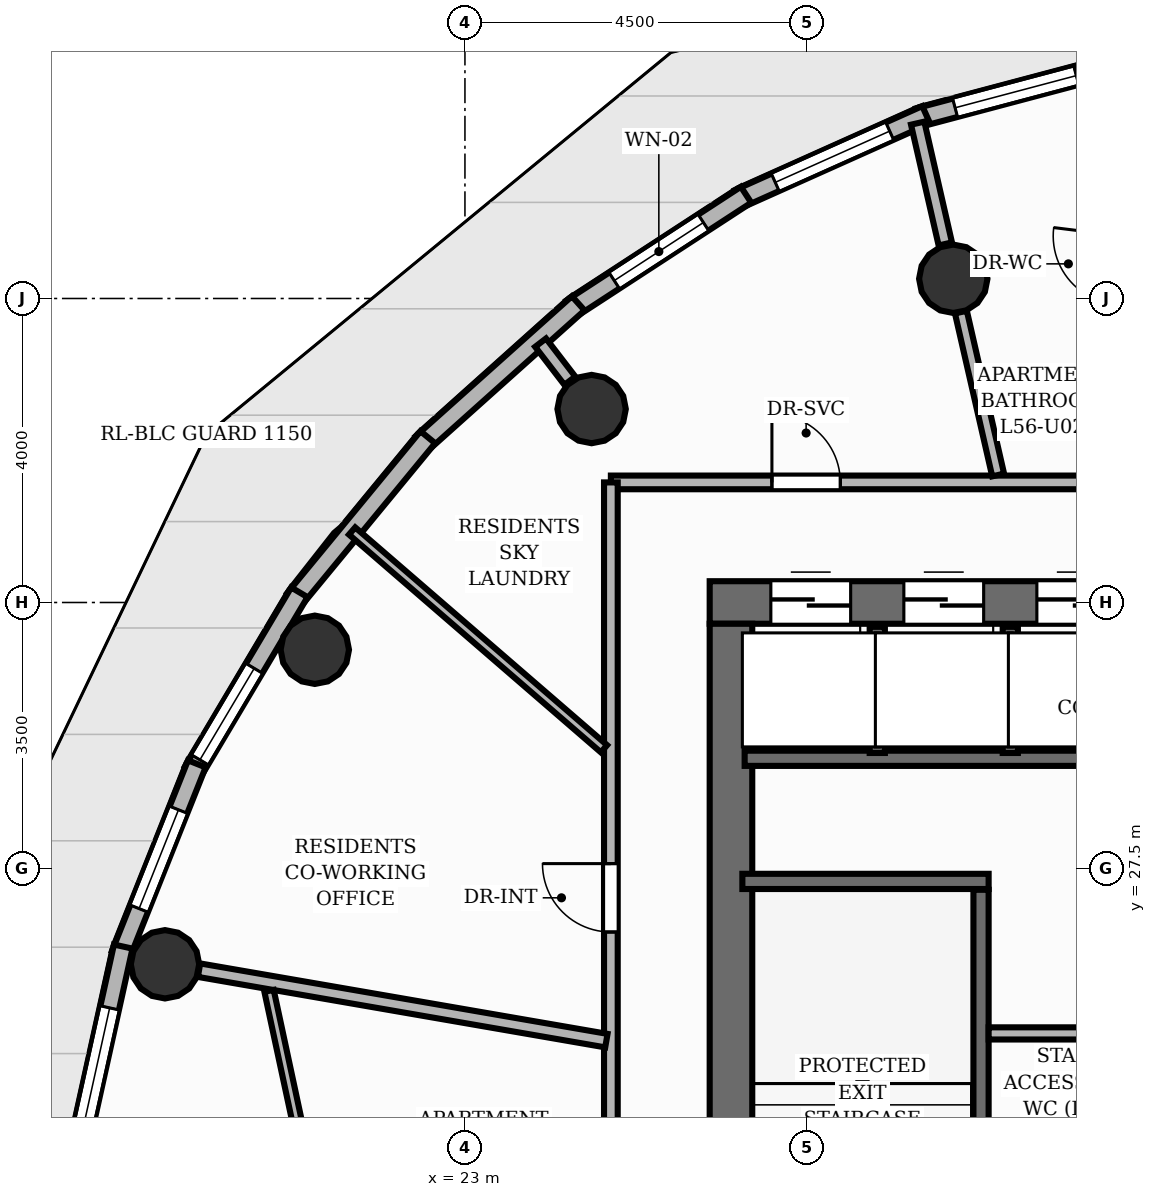
"""IFC4 building model, lengths in metres.
Left out: names, types, materials, properties, quantities, classifications, styles, units other than length and angle.
Written with IfcOpenShell. Run it as: python <this file> out.ifc"""

import sys

from ifc_helpers import new_model, si_unit, direction, frame, frame_2d, origin, origin_2d, place, context, subcontext, project, spatial, rectangle, circle, extrude, element, fill, save


model = new_model("IFC4")
c1 = context("Model", 3, precision=1e-05, world=origin(), true_north=direction((0.0, 1.0)))
c2 = subcontext(c1, "Body", "Model", "MODEL_VIEW")
j1 = project(units=[si_unit("LENGTHUNIT", "METRE"), si_unit("PLANEANGLEUNIT", "RADIAN")], contexts=[c1])
p1 = place(None, origin())
s1 = spatial("IfcSite", under=j1, at=p1, CompositionType="ELEMENT")
p2 = place(p1, origin())
s2 = spatial("IfcBuilding", under=s1, at=p2, CompositionType="ELEMENT")
p3 = place(p2, frame((0.0, 0.0, 188.64)))
s3 = spatial("IfcBuildingStorey", under=s2, at=p3, CompositionType="ELEMENT", Elevation=188.64)
p4 = place(p3, frame((26.22, 31.0, 0.0), z_axis=(0.0, 0.0, 1.0), x_axis=(1.0, 0.0, 0.0)))
e1 = element("IfcWall", 1, at=p4, inside=s3, PredefinedType="SHEAR", context=c2, shape_type="SweptSolid", body=[
    extrude(rectangle(XDim=11.56, YDim=0.56, at=frame_2d((5.78, 0.0))), origin(), (0.0, 0.0, 1.0), 3.2),
])
p5 = place(p4, frame((8.18, 0.0, 0.0)))
e2 = element("IfcOpeningElement", 2, at=p5, cuts=e1, PredefinedType="OPENING", context=c2, shape_type="SweptSolid", body=[
    extrude(rectangle(XDim=1.1, YDim=2.15, at=frame_2d((0.55, 1.075))), frame((0.0, 0.29, 0.0), z_axis=(0.0, -1.0, 0.0), x_axis=(1.0, 0.0, 0.0)), (0.0, 0.0, 1.0), 0.58),
])
p6 = place(p4, frame((0.805, 0.0, 0.0)))
e3 = element("IfcOpeningElement", 3, at=p6, cuts=e1, PredefinedType="OPENING", context=c2, shape_type="SweptSolid", body=[
    extrude(rectangle(XDim=1.05, YDim=2.15, at=frame_2d((0.525, 1.075))), frame((0.0, 0.29, 0.0), z_axis=(0.0, -1.0, 0.0), x_axis=(1.0, 0.0, 0.0)), (0.0, 0.0, 1.0), 0.58),
])
p7 = place(p4, frame((2.555, 0.0, 0.0)))
e4 = element("IfcOpeningElement", 4, at=p7, cuts=e1, PredefinedType="OPENING", context=c2, shape_type="SweptSolid", body=[
    extrude(rectangle(XDim=1.05, YDim=2.15, at=frame_2d((0.525, 1.075))), frame((0.0, 0.29, 0.0), z_axis=(0.0, -1.0, 0.0), x_axis=(1.0, 0.0, 0.0)), (0.0, 0.0, 1.0), 0.58),
])
p8 = place(p4, frame((4.305, 0.0, 0.0)))
e5 = element("IfcOpeningElement", 5, at=p8, cuts=e1, PredefinedType="OPENING", context=c2, shape_type="SweptSolid", body=[
    extrude(rectangle(XDim=1.05, YDim=2.15, at=frame_2d((0.525, 1.075))), frame((0.0, 0.29, 0.0), z_axis=(0.0, -1.0, 0.0), x_axis=(1.0, 0.0, 0.0)), (0.0, 0.0, 1.0), 0.58),
])
p9 = place(p3, frame((26.5, 17.28, 0.0), z_axis=(0.0, 0.0, 1.0), x_axis=(0.0, 1.0, 0.0)))
e6 = element("IfcWall", 6, at=p9, inside=s3, PredefinedType="SHEAR", context=c2, shape_type="SweptSolid", body=[
    extrude(rectangle(XDim=13.44, YDim=0.56, at=frame_2d((6.72, 0.0))), origin(), (0.0, 0.0, 1.0), 3.2),
])
for number, where, z_axis, x_axis in (
    (7, (29.425, 35.26, 0.0), (0.0, 0.0, 1.0), (1.0, 0.0, 0.0)),
    (8, (24.667, 33.545, 0.0), (0.0, 0.0, 1.0), (1.0, 0.0, 0.0)),
    (9, (21.025, 30.378, 0.0), (0.0, 0.0, 1.0), (1.0, 0.0, 0.0)),
    (10, (19.054, 26.24, 0.0), (0.0, 0.0, 1.0), (1.0, 0.0, 0.0)),
):
    element("IfcColumn", number, at=place(p3, frame(where, z_axis=z_axis, x_axis=x_axis)), inside=s3, PredefinedType="COLUMN", context=c2, shape_type="SweptSolid", body=[
        extrude(circle(Radius=0.45, at=origin_2d()), origin(), (0.0, 0.0, 1.0), 3.2),
    ])
p10 = place(p3, frame((28.965, 37.381, 0.0), z_axis=(0.0, 0.0, 1.0), x_axis=(0.96652474621, 0.256573410476, 0.0)))
e11 = element("IfcWall", 11, at=p10, inside=s3, PredefinedType="SOLIDWALL", context=c2, shape_type="SweptSolid", body=[
    extrude(rectangle(XDim=2.651, YDim=0.25, at=frame_2d((1.325, 0.0))), origin(), (0.0, 0.0, 1.0), 2.96),
])
p11 = place(p10, frame((0.501, 0.0, 0.85)))
e12 = element("IfcOpeningElement", 12, at=p11, cuts=e11, PredefinedType="OPENING", context=c2, shape_type="SweptSolid", body=[
    extrude(rectangle(XDim=1.65, YDim=1.55, at=frame_2d((0.825, 0.775))), frame((0.0, 0.135, 0.0), z_axis=(0.0, -1.0, 0.0), x_axis=(1.0, 0.0, 0.0)), (0.0, 0.0, 1.0), 0.27),
])
p12 = place(p3, frame((26.603, 36.313, 0.0), z_axis=(0.0, 0.0, 1.0), x_axis=(0.912615139532, 0.408819773368, 0.0)))
e13 = element("IfcWall", 13, at=p12, inside=s3, PredefinedType="SOLIDWALL", context=c2, shape_type="SweptSolid", body=[
    extrude(rectangle(XDim=2.702, YDim=0.25, at=frame_2d((1.351, 0.0))), origin(), (0.0, 0.0, 1.0), 2.96),
])
p13 = place(p12, frame((0.526, 0.0, 0.85)))
e14 = element("IfcOpeningElement", 14, at=p13, cuts=e13, PredefinedType="OPENING", context=c2, shape_type="SweptSolid", body=[
    extrude(rectangle(XDim=1.65, YDim=1.55, at=frame_2d((0.825, 0.775))), frame((0.0, 0.135, 0.0), z_axis=(0.0, -1.0, 0.0), x_axis=(1.0, 0.0, 0.0)), (0.0, 0.0, 1.0), 0.27),
])
p14 = place(p3, frame((24.404, 34.87, 0.0), z_axis=(0.0, 0.0, 1.0), x_axis=(0.837860586987, 0.545884270496, 0.0)))
e15 = element("IfcWall", 15, at=p14, inside=s3, PredefinedType="SOLIDWALL", context=c2, shape_type="SweptSolid", body=[
    extrude(rectangle(XDim=2.739, YDim=0.25, at=frame_2d((1.369, 0.0))), origin(), (0.0, 0.0, 1.0), 2.96),
])
p15 = place(p14, frame((0.669, 0.0, 0.85)))
e16 = element("IfcOpeningElement", 16, at=p15, cuts=e15, PredefinedType="OPENING", context=c2, shape_type="SweptSolid", body=[
    extrude(rectangle(XDim=1.4, YDim=1.55, at=frame_2d((0.7, 0.775))), frame((0.0, 0.135, 0.0), z_axis=(0.0, -1.0, 0.0), x_axis=(1.0, 0.0, 0.0)), (0.0, 0.0, 1.0), 0.27),
])
for number, where, z_axis, x_axis in (
    (17, (22.436, 33.096, 0.0), (0.0, 0.0, 1.0), (0.745, 0.667, 0.0)),
    (18, (20.759, 31.045, 0.0), (0.0, 0.0, 1.0), (0.635, 0.772, 0.0)),
):
    element("IfcWall", number, at=place(p3, frame(where, z_axis=z_axis, x_axis=x_axis)), inside=s3, PredefinedType="SOLIDWALL", context=c2, shape_type="SweptSolid", body=[
        extrude(rectangle(XDim=2.758, YDim=0.25, at=frame_2d((1.379, 0.0))), origin(), (0.0, 0.0, 1.0), 2.96),
    ])
p16 = place(p3, frame((19.424, 28.779, 0.0), z_axis=(0.0, 0.0, 1.0), x_axis=(0.510320389621, 0.859984360287, 0.0)))
e19 = element("IfcWall", 19, at=p16, inside=s3, PredefinedType="SOLIDWALL", context=c2, shape_type="SweptSolid", body=[
    extrude(rectangle(XDim=2.738, YDim=0.25, at=frame_2d((1.369, 0.0))), origin(), (0.0, 0.0, 1.0), 2.96),
])
p17 = place(p16, frame((0.175, 0.0, 0.85)))
e20 = element("IfcOpeningElement", 20, at=p17, cuts=e19, PredefinedType="OPENING", context=c2, shape_type="SweptSolid", body=[
    extrude(rectangle(XDim=1.4, YDim=1.55, at=frame_2d((0.7, 0.775))), frame((0.0, 0.135, 0.0), z_axis=(0.0, -1.0, 0.0), x_axis=(1.0, 0.0, 0.0)), (0.0, 0.0, 1.0), 0.27),
])
p18 = place(p3, frame((18.472, 26.367, 0.0), z_axis=(0.0, 0.0, 1.0), x_axis=(0.370330939431, 0.928899884433, 0.0)))
e21 = element("IfcWall", 21, at=p18, inside=s3, PredefinedType="SOLIDWALL", context=c2, shape_type="SweptSolid", body=[
    extrude(rectangle(XDim=2.702, YDim=0.25, at=frame_2d((1.351, 0.0))), origin(), (0.0, 0.0, 1.0), 2.96),
])
p19 = place(p18, frame((0.651, 0.0, 0.85)))
e22 = element("IfcOpeningElement", 22, at=p19, cuts=e21, PredefinedType="OPENING", context=c2, shape_type="SweptSolid", body=[
    extrude(rectangle(XDim=1.4, YDim=1.55, at=frame_2d((0.7, 0.775))), frame((0.0, 0.135, 0.0), z_axis=(0.0, -1.0, 0.0), x_axis=(1.0, 0.0, 0.0)), (0.0, 0.0, 1.0), 0.27),
])
p20 = place(p3, frame((17.932, 23.884, 0.0), z_axis=(0.0, 0.0, 1.0), x_axis=(0.215877166516, 0.976420528756, 0.0)))
e23 = element("IfcWall", 23, at=p20, inside=s3, PredefinedType="SOLIDWALL", context=c2, shape_type="SweptSolid", body=[
    extrude(rectangle(XDim=2.651, YDim=0.25, at=frame_2d((1.325, 0.0))), origin(), (0.0, 0.0, 1.0), 2.96),
])
p21 = place(p20, frame((0.175, 0.0, 0.85)))
e24 = element("IfcOpeningElement", 24, at=p21, cuts=e23, PredefinedType="OPENING", context=c2, shape_type="SweptSolid", body=[
    extrude(rectangle(XDim=1.65, YDim=1.55, at=frame_2d((0.825, 0.775))), frame((0.0, 0.135, 0.0), z_axis=(0.0, -1.0, 0.0), x_axis=(1.0, 0.0, 0.0)), (0.0, 0.0, 1.0), 0.27),
])
p22 = place(p3, frame((29.79, 20.78, 0.0), z_axis=(0.0, 0.0, 1.0), x_axis=(0.0, 1.0, 0.0)))
e25 = element("IfcWall", 25, at=p22, inside=s3, PredefinedType="SHEAR", context=c2, shape_type="SweptSolid", body=[
    extrude(rectangle(XDim=6.44, YDim=0.2, at=frame_2d((3.22, 0.0))), origin(), (0.0, 0.0, 1.0), 3.2),
])
p23 = place(p3, frame((26.65, 27.33, 0.0), z_axis=(0.0, 0.0, 1.0), x_axis=(1.0, 0.0, 0.0)))
e26 = element("IfcWall", 26, at=p23, inside=s3, PredefinedType="SHEAR", context=c2, shape_type="SweptSolid", body=[
    extrude(rectangle(XDim=3.24, YDim=0.2, at=frame_2d((1.62, 0.0))), origin(), (0.0, 0.0, 1.0), 3.2),
])
p24 = place(p3, frame((26.68, 28.95, 0.0), z_axis=(0.0, 0.0, 1.0), x_axis=(1.0, 0.0, 0.0)))
e27 = element("IfcWall", 27, at=p24, inside=s3, PredefinedType="SHEAR", context=c2, shape_type="SweptSolid", body=[
    extrude(rectangle(XDim=5.24, YDim=0.2, at=frame_2d((2.62, 0.0))), origin(), (0.0, 0.0, 1.0), 3.2),
])
for number, where, z_axis, x_axis in (
    (28, (28.425, 29.02, 0.0), (0.0, 0.0, 1.0), (0.0, 1.0, 0.0)),
    (29, (30.175, 29.02, 0.0), (0.0, 0.0, 1.0), (0.0, 1.0, 0.0)),
):
    element("IfcWall", number, at=place(p3, frame(where, z_axis=z_axis, x_axis=x_axis)), inside=s3, PredefinedType="SHEAR", context=c2, shape_type="SweptSolid", body=[
        extrude(rectangle(XDim=1.66, YDim=0.2, at=frame_2d((0.83, 0.0))), origin(), (0.0, 0.0, 1.0), 3.2),
    ])
p25 = place(p3, frame((29.89, 25.33, 0.0), z_axis=(0.0, 0.0, 1.0), x_axis=(1.0, 0.0, 0.0)))
e30 = element("IfcWall", 30, at=p25, inside=s3, PredefinedType="PLUMBINGWALL", context=c2, shape_type="SweptSolid", body=[
    extrude(rectangle(XDim=1.94, YDim=0.16, at=frame_2d((0.97, 0.0))), origin(), (0.0, 0.0, 1.0), 2.955),
])
p26 = place(p3, frame((29.32, 35.718, 0.0), z_axis=(0.0, 0.0, 1.0), x_axis=(-0.222967107114, 0.974825968645, 0.0)))
e31 = element("IfcWall", 31, at=p26, inside=s3, PredefinedType="PARTITIONING", context=c2, shape_type="SweptSolid", body=[
    extrude(rectangle(XDim=1.63, YDim=0.18, at=frame_2d((0.815, 0.0))), origin(), (0.0, 0.0, 1.0), 2.404),
])
p27 = place(p3, frame((24.38, 33.918, 0.0), z_axis=(0.0, 0.0, 1.0), x_axis=(-0.609112888366, 0.793083532314, 0.0)))
e32 = element("IfcWall", 32, at=p27, inside=s3, PredefinedType="PARTITIONING", context=c2, shape_type="SweptSolid", body=[
    extrude(rectangle(XDim=0.632, YDim=0.18, at=frame_2d((0.316, 0.0))), origin(), (0.0, 0.0, 1.0), 2.404),
])
p28 = place(p3, frame((24.92, 32.58, 0.0), z_axis=(0.0, 0.0, 1.0), x_axis=(1.0, 0.0, 0.0)))
e33 = element("IfcWall", 33, at=p28, inside=s3, PredefinedType="PARTITIONING", context=c2, shape_type="SweptSolid", body=[
    extrude(rectangle(XDim=14.16, YDim=0.18, at=frame_2d((7.08, 0.0))), origin(), (0.0, 0.0, 1.0), 2.955),
])
p29 = place(p28, frame((8.186, 0.0, 0.0)))
e34 = element("IfcOpeningElement", 34, at=p29, cuts=e33, PredefinedType="OPENING", context=c2, shape_type="SweptSolid", body=[
    extrude(rectangle(XDim=1.05, YDim=2.15, at=frame_2d((0.525, 1.075))), frame((0.0, 0.1, 0.0), z_axis=(0.0, -1.0, 0.0), x_axis=(1.0, 0.0, 0.0)), (0.0, 0.0, 1.0), 0.2),
])
p30 = place(p28, frame((2.119, 0.0, 0.0)))
e35 = element("IfcOpeningElement", 35, at=p30, cuts=e33, PredefinedType="OPENING", context=c2, shape_type="SweptSolid", body=[
    extrude(rectangle(XDim=0.9, YDim=2.1, at=frame_2d((0.45, 1.05))), frame((0.0, 0.1, 0.0), z_axis=(0.0, -1.0, 0.0), x_axis=(1.0, 0.0, 0.0)), (0.0, 0.0, 1.0), 0.2),
])
p31 = place(p3, frame((24.92, 19.382, 0.0), z_axis=(0.0, 0.0, 1.0), x_axis=(0.0, 1.0, 0.0)))
e36 = element("IfcWall", 36, at=p31, inside=s3, PredefinedType="PARTITIONING", context=c2, shape_type="SweptSolid", body=[
    extrude(rectangle(XDim=13.198, YDim=0.18, at=frame_2d((6.599, 0.0))), origin(), (0.0, 0.0, 1.0), 2.955),
])
p32 = place(p31, frame((7.282, 0.0, 0.0)))
e37 = element("IfcOpeningElement", 37, at=p32, cuts=e36, PredefinedType="OPENING", context=c2, shape_type="SweptSolid", body=[
    extrude(rectangle(XDim=0.9, YDim=2.1, at=frame_2d((0.45, 1.05))), frame((0.0, 0.1, 0.0), z_axis=(0.0, -1.0, 0.0), x_axis=(1.0, 0.0, 0.0)), (0.0, 0.0, 1.0), 0.2),
])
p33 = place(p3, frame((30.015, 32.677, 0.0), z_axis=(0.0, 0.0, 1.0), x_axis=(-0.222969522248, 0.974825416241, 0.0)))
e38 = element("IfcWall", 38, at=p33, inside=s3, PredefinedType="PLUMBINGWALL", context=c2, shape_type="SweptSolid", body=[
    extrude(rectangle(XDim=2.199, YDim=0.16, at=frame_2d((1.099, 0.0))), origin(), (0.0, 0.0, 1.0), 2.404),
])
p34 = place(p3, frame((21.515, 31.941, 0.0), z_axis=(0.0, 0.0, 1.0), x_axis=(0.756468247818, -0.654030419815, 0.0)))
e39 = element("IfcWall", 39, at=p34, inside=s3, PredefinedType="PARTITIONING", context=c2, shape_type="SweptSolid", body=[
    extrude(rectangle(XDim=4.381, YDim=0.125, at=frame_2d((2.19, 0.0))), origin(), (0.0, 0.0, 1.0), 2.692),
])
p35 = place(p3, frame((24.861, 25.235, 0.0), z_axis=(0.0, 0.0, 1.0), x_axis=(-0.985368487575, 0.170437506711, 0.0)))
e40 = element("IfcWall", 40, at=p35, inside=s3, PredefinedType="PARTITIONING", context=c2, shape_type="SweptSolid", body=[
    extrude(rectangle(XDim=5.439, YDim=0.18, at=frame_2d((2.719, 0.0))), origin(), (0.0, 0.0, 1.0), 2.404),
])
p36 = place(p3, frame((22.173, 17.735, 0.0), z_axis=(0.0, 0.0, 1.0), x_axis=(-0.20987090056, 0.977729106194, 0.0)))
e41 = element("IfcWall", 41, at=p36, inside=s3, PredefinedType="PARTITIONING", context=c2, shape_type="SweptSolid", body=[
    extrude(rectangle(XDim=8.341, YDim=0.125, at=frame_2d((4.17, 0.0))), origin(), (0.0, 0.0, 1.0), 2.955),
])
p37 = place(p36, frame((3.72, 0.0, 0.0)))
e42 = element("IfcOpeningElement", 42, at=p37, cuts=e41, PredefinedType="OPENING", context=c2, shape_type="SweptSolid", body=[
    extrude(rectangle(XDim=0.9, YDim=2.1, at=frame_2d((0.45, 1.05))), frame((0.0, 0.073, 0.0), z_axis=(0.0, -1.0, 0.0), x_axis=(1.0, 0.0, 0.0)), (0.0, 0.0, 1.0), 0.145),
])
p38 = place(p11, origin())
e43 = element("IfcWindow", 43, at=p38, inside=s3, PartitioningType="SINGLE_PANEL", PredefinedType="WINDOW", context=c2, shape_type="SweptSolid", body=[
    extrude(rectangle(XDim=1.65, YDim=1.55, at=frame_2d((0.825, 0.775))), frame((0.0, 0.03, 0.0), z_axis=(0.0, -1.0, 0.0), x_axis=(1.0, 0.0, 0.0)), (0.0, 0.0, 1.0), 0.06),
])
fill(e12, e43)
p39 = place(p13, origin())
e44 = element("IfcWindow", 44, at=p39, inside=s3, PartitioningType="SINGLE_PANEL", PredefinedType="WINDOW", context=c2, shape_type="SweptSolid", body=[
    extrude(rectangle(XDim=1.65, YDim=1.55, at=frame_2d((0.825, 0.775))), frame((0.0, 0.03, 0.0), z_axis=(0.0, -1.0, 0.0), x_axis=(1.0, 0.0, 0.0)), (0.0, 0.0, 1.0), 0.06),
])
fill(e14, e44)
p40 = place(p15, origin())
e45 = element("IfcWindow", 45, at=p40, inside=s3, PartitioningType="SINGLE_PANEL", PredefinedType="WINDOW", context=c2, shape_type="SweptSolid", body=[
    extrude(rectangle(XDim=1.4, YDim=1.55, at=frame_2d((0.7, 0.775))), frame((0.0, 0.03, 0.0), z_axis=(0.0, -1.0, 0.0), x_axis=(1.0, 0.0, 0.0)), (0.0, 0.0, 1.0), 0.06),
])
fill(e16, e45)
p41 = place(p17, origin())
e46 = element("IfcWindow", 46, at=p41, inside=s3, PartitioningType="SINGLE_PANEL", PredefinedType="WINDOW", context=c2, shape_type="SweptSolid", body=[
    extrude(rectangle(XDim=1.4, YDim=1.55, at=frame_2d((0.7, 0.775))), frame((0.0, 0.03, 0.0), z_axis=(0.0, -1.0, 0.0), x_axis=(1.0, 0.0, 0.0)), (0.0, 0.0, 1.0), 0.06),
])
fill(e20, e46)
p42 = place(p19, origin())
e47 = element("IfcWindow", 47, at=p42, inside=s3, PartitioningType="SINGLE_PANEL", PredefinedType="WINDOW", context=c2, shape_type="SweptSolid", body=[
    extrude(rectangle(XDim=1.4, YDim=1.55, at=frame_2d((0.7, 0.775))), frame((0.0, 0.03, 0.0), z_axis=(0.0, -1.0, 0.0), x_axis=(1.0, 0.0, 0.0)), (0.0, 0.0, 1.0), 0.06),
])
fill(e22, e47)
p43 = place(p21, origin())
e48 = element("IfcWindow", 48, at=p43, inside=s3, PartitioningType="SINGLE_PANEL", PredefinedType="WINDOW", context=c2, shape_type="SweptSolid", body=[
    extrude(rectangle(XDim=1.65, YDim=1.55, at=frame_2d((0.825, 0.775))), frame((0.0, 0.03, 0.0), z_axis=(0.0, -1.0, 0.0), x_axis=(1.0, 0.0, 0.0)), (0.0, 0.0, 1.0), 0.06),
])
fill(e24, e48)
p44 = place(p6, origin())
e49 = element("IfcDoor", 49, at=p44, inside=s3, OperationType="DOUBLE_DOOR_SLIDING", PredefinedType="DOOR", context=c2, shape_type="SweptSolid", body=[
    extrude(rectangle(XDim=1.05, YDim=2.15, at=frame_2d((0.525, 1.075))), frame((0.0, 0.025, 0.0), z_axis=(0.0, -1.0, 0.0), x_axis=(1.0, 0.0, 0.0)), (0.0, 0.0, 1.0), 0.05),
])
fill(e3, e49)
p45 = place(p7, origin())
e50 = element("IfcDoor", 50, at=p45, inside=s3, OperationType="DOUBLE_DOOR_SLIDING", PredefinedType="DOOR", context=c2, shape_type="SweptSolid", body=[
    extrude(rectangle(XDim=1.05, YDim=2.15, at=frame_2d((0.525, 1.075))), frame((0.0, 0.025, 0.0), z_axis=(0.0, -1.0, 0.0), x_axis=(1.0, 0.0, 0.0)), (0.0, 0.0, 1.0), 0.05),
])
fill(e4, e50)
p46 = place(p8, origin())
e51 = element("IfcDoor", 51, at=p46, inside=s3, OperationType="DOUBLE_DOOR_SLIDING", PredefinedType="DOOR", context=c2, shape_type="SweptSolid", body=[
    extrude(rectangle(XDim=1.05, YDim=2.15, at=frame_2d((0.525, 1.075))), frame((0.0, 0.025, 0.0), z_axis=(0.0, -1.0, 0.0), x_axis=(1.0, 0.0, 0.0)), (0.0, 0.0, 1.0), 0.05),
])
fill(e5, e51)
p47 = place(p32, origin())
e52 = element("IfcDoor", 52, at=p47, inside=s3, OperationType="SINGLE_SWING_RIGHT", PredefinedType="DOOR", context=c2, shape_type="SweptSolid", body=[
    extrude(rectangle(XDim=0.9, YDim=2.1, at=frame_2d((0.45, 1.05))), frame((0.0, 0.025, 0.0), z_axis=(0.0, -1.0, 0.0), x_axis=(1.0, 0.0, 0.0)), (0.0, 0.0, 1.0), 0.05),
])
fill(e37, e52)
p48 = place(p30, origin())
e53 = element("IfcDoor", 53, at=p48, inside=s3, OperationType="SINGLE_SWING_LEFT", PredefinedType="DOOR", context=c2, shape_type="SweptSolid", body=[
    extrude(rectangle(XDim=0.9, YDim=2.1, at=frame_2d((0.45, 1.05))), frame((0.0, 0.025, 0.0), z_axis=(0.0, -1.0, 0.0), x_axis=(1.0, 0.0, 0.0)), (0.0, 0.0, 1.0), 0.05),
])
fill(e35, e53)
save(model, sys.argv[1])
